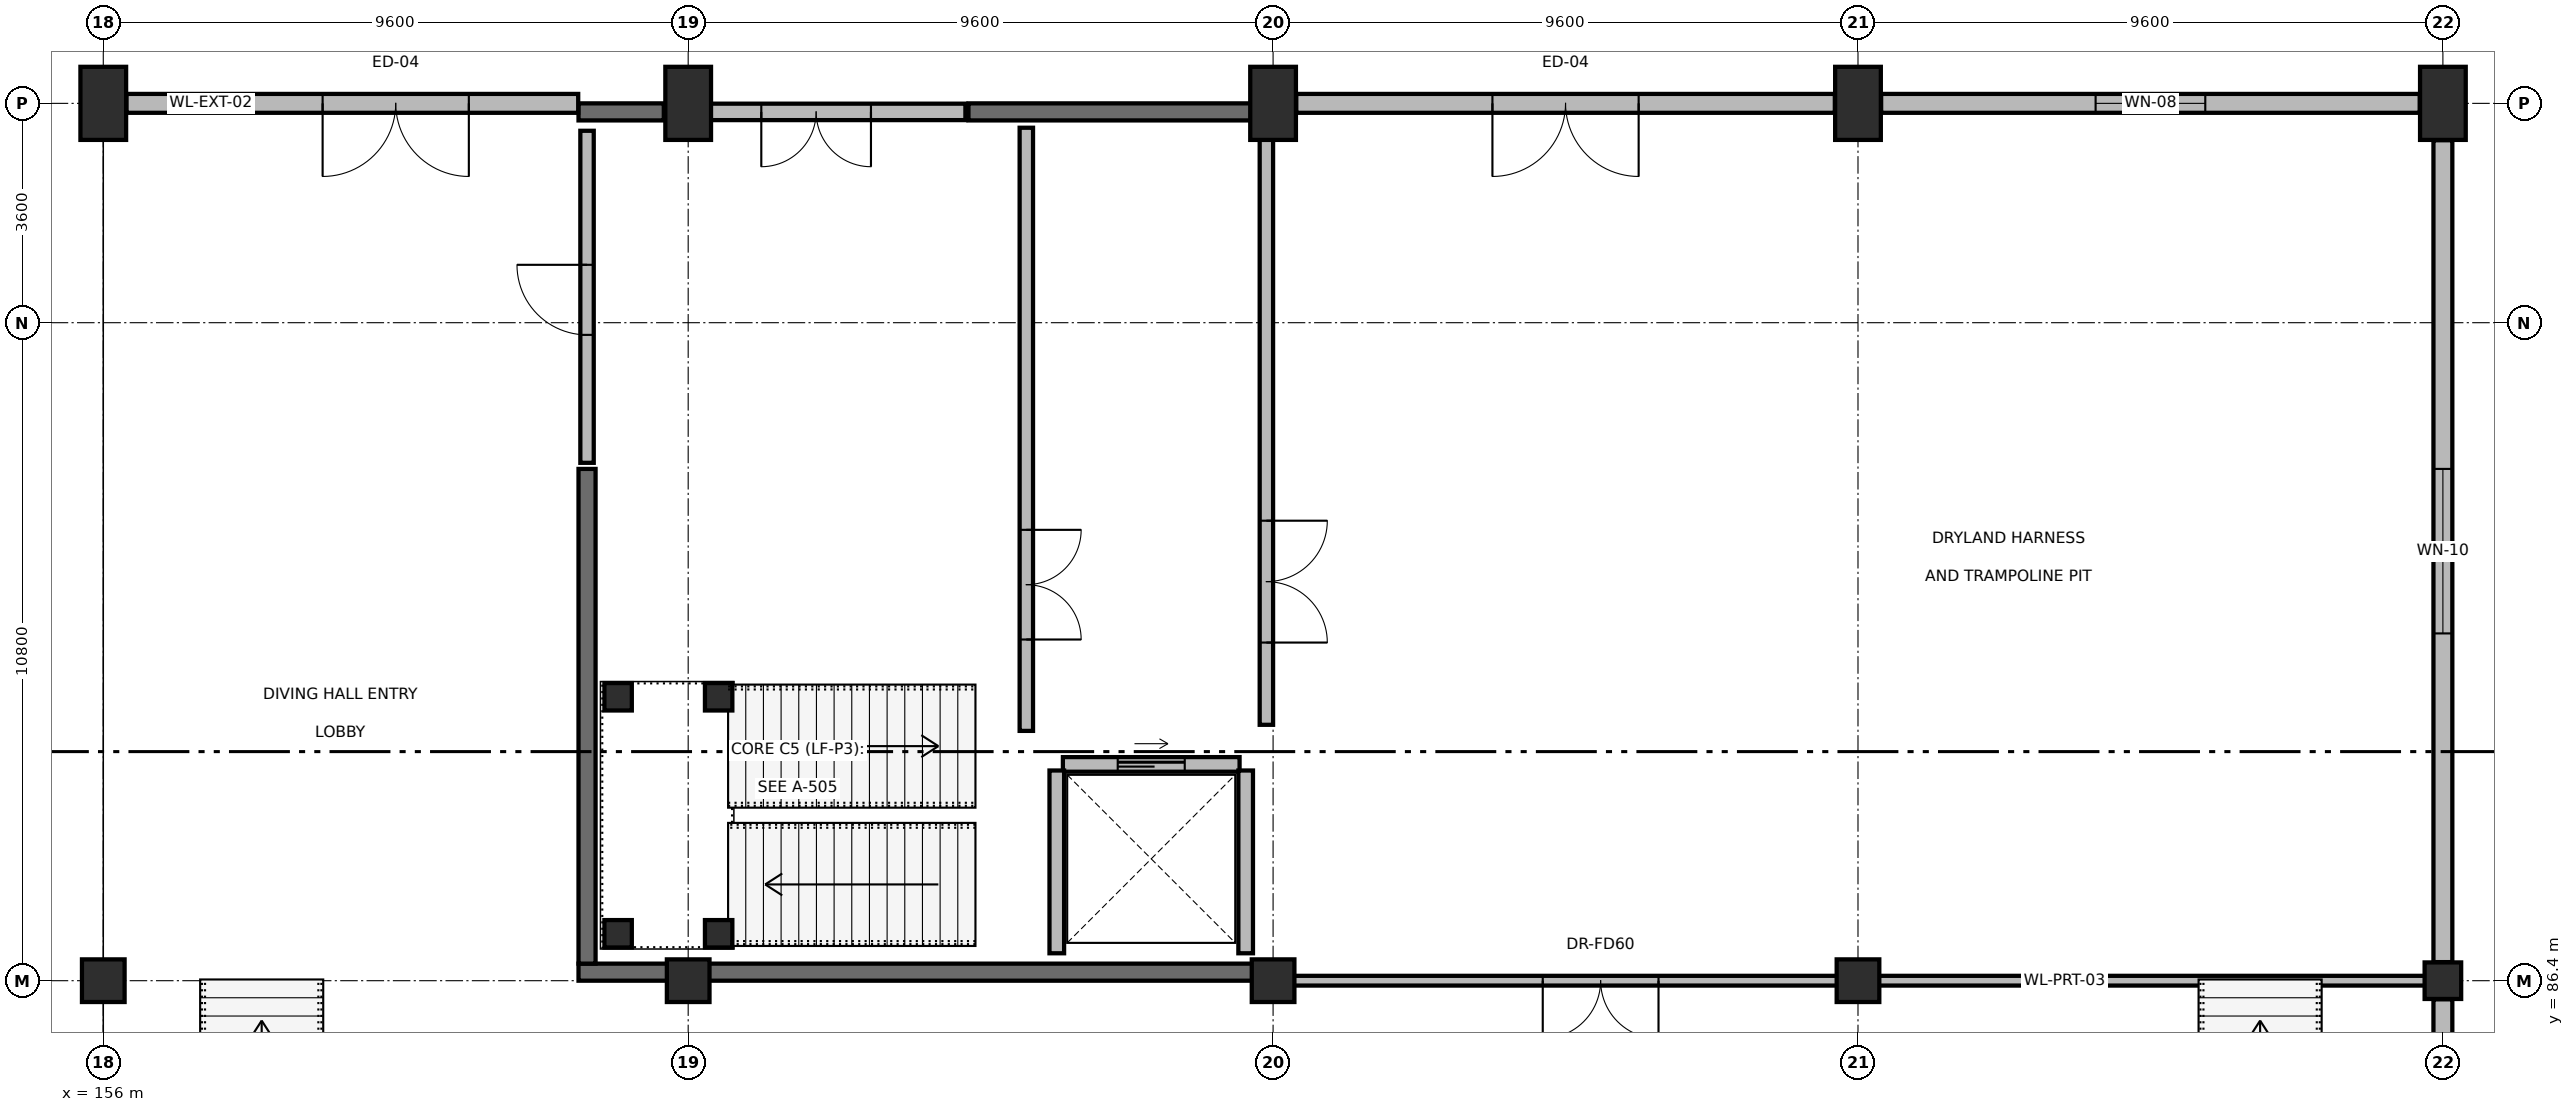
"""IFC4 building model, lengths in metres.
Left out: names, types, materials, properties, quantities, classifications, styles, units other than length and angle.
Written with IfcOpenShell. Run it as: python <this file> out.ifc"""

import sys

from ifc_helpers import new_model, si_unit, direction, frame, frame_2d, origin, origin_2d, place, context, subcontext, project, spatial, rectangle, extrude, element, fill, save


model = new_model("IFC4")
c1 = context("Model", 3, precision=1e-05, world=origin(), true_north=direction((0.0, 1.0)))
c2 = subcontext(c1, "Body", "Model", "MODEL_VIEW")
j1 = project(units=[si_unit("LENGTHUNIT", "METRE"), si_unit("PLANEANGLEUNIT", "RADIAN")], contexts=[c1])
p1 = place(None, origin())
s1 = spatial("IfcSite", under=j1, at=p1, CompositionType="ELEMENT")
p2 = place(p1, origin())
s2 = spatial("IfcBuilding", under=s1, at=p2, CompositionType="ELEMENT")
p3 = place(p2, origin())
s3 = spatial("IfcBuildingStorey", under=s2, at=p3, CompositionType="ELEMENT", Elevation=0.0)
for number, where, z_axis, x_axis in (
    (1, (156.0, 100.8, 0.0), (0.0, 0.0, 1.0), (1.0, 0.0, 0.0)),
    (2, (165.6, 100.8, 0.0), (0.0, 0.0, 1.0), (1.0, 0.0, 0.0)),
    (3, (175.2, 100.8, 0.0), (0.0, 0.0, 1.0), (1.0, 0.0, 0.0)),
    (4, (184.8, 100.8, 0.0), (0.0, 0.0, 1.0), (1.0, 0.0, 0.0)),
    (5, (194.4, 100.8, 0.0), (0.0, 0.0, 1.0), (1.0, 0.0, 0.0)),
):
    element("IfcColumn", number, at=place(p3, frame(where, z_axis=z_axis, x_axis=x_axis)), inside=s3, PredefinedType="COLUMN", context=c2, shape_type="SweptSolid", body=[
        extrude(rectangle(XDim=0.75, YDim=1.2, at=origin_2d()), origin(), (0.0, 0.0, 1.0), 4.8),
    ])
for number, where, z_axis, x_axis in (
    (6, (156.0, 86.4, 0.0), (0.0, 0.0, 1.0), (1.0, 0.0, 0.0)),
    (7, (165.6, 86.4, 0.0), (0.0, 0.0, 1.0), (1.0, 0.0, 0.0)),
    (8, (175.2, 86.4, 0.0), (0.0, 0.0, 1.0), (1.0, 0.0, 0.0)),
    (9, (184.8, 86.4, 0.0), (0.0, 0.0, 1.0), (1.0, 0.0, 0.0)),
):
    element("IfcColumn", number, at=place(p3, frame(where, z_axis=z_axis, x_axis=x_axis)), inside=s3, PredefinedType="COLUMN", context=c2, shape_type="SweptSolid", body=[
        extrude(rectangle(XDim=0.7, YDim=0.7, at=origin_2d()), origin(), (0.0, 0.0, 1.0), 4.8),
    ])
p4 = place(p3, frame((194.4, 86.4, 0.0), z_axis=(0.0, 0.0, 1.0), x_axis=(1.0, 0.0, 0.0)))
e10 = element("IfcColumn", 10, at=p4, inside=s3, PredefinedType="COLUMN", context=c2, shape_type="SweptSolid", body=[
    extrude(rectangle(XDim=0.6, YDim=0.6, at=origin_2d()), origin(), (0.0, 0.0, 1.0), 4.8),
])
p5 = place(p3, frame((163.8, 86.54, 0.0), z_axis=(0.0, 0.0, 1.0), x_axis=(1.0, 0.0, 0.0)))
e11 = element("IfcWall", 11, at=p5, inside=s3, PredefinedType="SHEAR", context=c2, shape_type="SweptSolid", body=[
    extrude(rectangle(XDim=11.4, YDim=0.28, at=frame_2d((5.7, 0.0))), origin(), (0.0, 0.0, 1.0), 4.8),
])
p6 = place(p3, frame((163.8, 100.66, 0.0), z_axis=(0.0, 0.0, 1.0), x_axis=(1.0, 0.0, 0.0)))
e12 = element("IfcWall", 12, at=p6, inside=s3, PredefinedType="SHEAR", context=c2, shape_type="SweptSolid", body=[
    extrude(rectangle(XDim=1.4, YDim=0.28, at=frame_2d((0.7, 0.0))), origin(), (0.0, 0.0, 1.0), 4.8),
])
p7 = place(p3, frame((170.2, 100.66, 0.0), z_axis=(0.0, 0.0, 1.0), x_axis=(1.0, 0.0, 0.0)))
e13 = element("IfcWall", 13, at=p7, inside=s3, PredefinedType="SHEAR", context=c2, shape_type="SweptSolid", body=[
    extrude(rectangle(XDim=5.0, YDim=0.28, at=frame_2d((2.5, 0.0))), origin(), (0.0, 0.0, 1.0), 4.8),
])
p8 = place(p3, frame((163.94, 86.68, 0.0), z_axis=(0.0, 0.0, 1.0), x_axis=(0.0, 1.0, 0.0)))
e14 = element("IfcWall", 14, at=p8, inside=s3, PredefinedType="SHEAR", context=c2, shape_type="SweptSolid", body=[
    extrude(rectangle(XDim=8.12, YDim=0.28, at=frame_2d((4.06, 0.0))), origin(), (0.0, 0.0, 1.0), 4.8),
])
p9 = place(p3, frame((156.38, 100.8, 0.0), z_axis=(0.0, 0.0, 1.0), x_axis=(1.0, 0.0, 0.0)))
e15 = element("IfcWall", 15, at=p9, inside=s3, PredefinedType="SOLIDWALL", context=c2, shape_type="SweptSolid", body=[
    extrude(rectangle(XDim=7.415, YDim=0.31, at=frame_2d((3.708, 0.0))), origin(), (0.0, 0.0, 1.0), 3.835),
])
p10 = place(p9, frame((3.22, 0.0, 0.0)))
e16 = element("IfcOpeningElement", 16, at=p10, cuts=e15, PredefinedType="OPENING", context=c2, shape_type="SweptSolid", body=[
    extrude(rectangle(XDim=2.4, YDim=2.4, at=frame_2d((1.2, 1.2))), frame((0.0, 0.165, 0.0), z_axis=(0.0, -1.0, 0.0), x_axis=(1.0, 0.0, 0.0)), (0.0, 0.0, 1.0), 0.33),
])
p11 = place(p3, frame((175.58, 100.8, 0.0), z_axis=(0.0, 0.0, 1.0), x_axis=(1.0, 0.0, 0.0)))
e17 = element("IfcWall", 17, at=p11, inside=s3, PredefinedType="SOLIDWALL", context=c2, shape_type="SweptSolid", body=[
    extrude(rectangle(XDim=8.84, YDim=0.31, at=frame_2d((4.42, 0.0))), origin(), (0.0, 0.0, 1.0), 3.835),
])
p12 = place(p11, frame((3.22, 0.0, 0.0)))
e18 = element("IfcOpeningElement", 18, at=p12, cuts=e17, PredefinedType="OPENING", context=c2, shape_type="SweptSolid", body=[
    extrude(rectangle(XDim=2.4, YDim=2.4, at=frame_2d((1.2, 1.2))), frame((0.0, 0.165, 0.0), z_axis=(0.0, -1.0, 0.0), x_axis=(1.0, 0.0, 0.0)), (0.0, 0.0, 1.0), 0.33),
])
p13 = place(p3, frame((185.18, 100.8, 0.0), z_axis=(0.0, 0.0, 1.0), x_axis=(1.0, 0.0, 0.0)))
e19 = element("IfcWall", 19, at=p13, inside=s3, PredefinedType="SOLIDWALL", context=c2, shape_type="SweptSolid", body=[
    extrude(rectangle(XDim=8.84, YDim=0.31, at=frame_2d((4.42, 0.0))), origin(), (0.0, 0.0, 1.0), 3.835),
])
p14 = place(p13, frame((3.52, 0.0, 0.95)))
e20 = element("IfcOpeningElement", 20, at=p14, cuts=e19, PredefinedType="OPENING", context=c2, shape_type="SweptSolid", body=[
    extrude(rectangle(XDim=1.8, YDim=1.2, at=frame_2d((0.9, 0.6))), frame((0.0, 0.165, 0.0), z_axis=(0.0, -1.0, 0.0), x_axis=(1.0, 0.0, 0.0)), (0.0, 0.0, 1.0), 0.33),
])
p15 = place(p3, frame((194.4, 86.095, 0.0), z_axis=(0.0, 0.0, 1.0), x_axis=(0.0, -1.0, 0.0)))
e21 = element("IfcWall", 21, at=p15, inside=s3, PredefinedType="SOLIDWALL", context=c2, shape_type="SweptSolid", body=[
    extrude(rectangle(XDim=8.515, YDim=0.31, at=frame_2d((4.257, 0.0))), origin(), (0.0, 0.0, 1.0), 3.95),
])
p16 = place(p15, frame((3.058, 0.0, 0.0)))
e22 = element("IfcOpeningElement", 22, at=p16, cuts=e21, PredefinedType="OPENING", context=c2, shape_type="SweptSolid", body=[
    extrude(rectangle(XDim=2.4, YDim=2.4, at=frame_2d((1.2, 1.2))), frame((0.0, 0.165, 0.0), z_axis=(0.0, -1.0, 0.0), x_axis=(1.0, 0.0, 0.0)), (0.0, 0.0, 1.0), 0.33),
])
p17 = place(p3, frame((194.4, 100.195, 0.0), z_axis=(0.0, 0.0, 1.0), x_axis=(0.0, -1.0, 0.0)))
e23 = element("IfcWall", 23, at=p17, inside=s3, PredefinedType="SOLIDWALL", context=c2, shape_type="SweptSolid", body=[
    extrude(rectangle(XDim=13.49, YDim=0.31, at=frame_2d((6.745, 0.0))), origin(), (0.0, 0.0, 1.0), 3.835),
])
p18 = place(p17, frame((5.395, 0.0, 0.95)))
e24 = element("IfcOpeningElement", 24, at=p18, cuts=e23, PredefinedType="OPENING", context=c2, shape_type="SweptSolid", body=[
    extrude(rectangle(XDim=2.7, YDim=1.5, at=frame_2d((1.35, 0.75))), frame((0.0, 0.165, 0.0), z_axis=(0.0, -1.0, 0.0), x_axis=(1.0, 0.0, 0.0)), (0.0, 0.0, 1.0), 0.33),
])
p19 = place(p3, frame((165.25, 100.66, 0.0), z_axis=(0.0, 0.0, 1.0), x_axis=(1.0, 0.0, 0.0)))
e25 = element("IfcWall", 25, at=p19, inside=s3, PredefinedType="SOLIDWALL", context=c2, shape_type="SweptSolid", body=[
    extrude(rectangle(XDim=4.9, YDim=0.27, at=frame_2d((2.45, 0.0))), origin(), (0.0, 0.0, 1.0), 3.835),
])
p20 = place(p19, frame((1.55, 0.0, 0.0)))
e26 = element("IfcOpeningElement", 26, at=p20, cuts=e25, PredefinedType="OPENING", context=c2, shape_type="SweptSolid", body=[
    extrude(rectangle(XDim=1.8, YDim=2.3, at=frame_2d((0.9, 1.15))), frame((0.0, 0.145, 0.0), z_axis=(0.0, -1.0, 0.0), x_axis=(1.0, 0.0, 0.0)), (0.0, 0.0, 1.0), 0.29),
])
p21 = place(p3, frame((171.15, 90.5, 0.0), z_axis=(0.0, 0.0, 1.0), x_axis=(0.0, 1.0, 0.0)))
e27 = element("IfcWall", 27, at=p21, inside=s3, PredefinedType="PARTITIONING", context=c2, shape_type="SweptSolid", body=[
    extrude(rectangle(XDim=9.9, YDim=0.22, at=frame_2d((4.95, 0.0))), origin(), (0.0, 0.0, 1.0), 4.505),
])
p22 = place(p21, frame((1.5, 0.0, 0.0)))
e28 = element("IfcOpeningElement", 28, at=p22, cuts=e27, PredefinedType="OPENING", context=c2, shape_type="SweptSolid", body=[
    extrude(rectangle(XDim=1.8, YDim=2.2, at=frame_2d((0.9, 1.1))), frame((0.0, 0.12, 0.0), z_axis=(0.0, -1.0, 0.0), x_axis=(1.0, 0.0, 0.0)), (0.0, 0.0, 1.0), 0.24),
])
p23 = place(p3, frame((171.75, 89.95, 0.0), z_axis=(0.0, 0.0, 1.0), x_axis=(1.0, 0.0, 0.0)))
e29 = element("IfcWall", 29, at=p23, inside=s3, PredefinedType="SOLIDWALL", context=c2, shape_type="SweptSolid", body=[
    extrude(rectangle(XDim=2.9, YDim=0.24, at=frame_2d((1.45, 0.0))), origin(), (0.0, 0.0, 1.0), 4.505),
])
p24 = place(p23, frame((0.9, 0.0, 0.0)))
e30 = element("IfcOpeningElement", 30, at=p24, cuts=e29, PredefinedType="OPENING", context=c2, shape_type="SweptSolid", body=[
    extrude(rectangle(XDim=1.1, YDim=2.15, at=frame_2d((0.55, 1.075))), frame((0.0, 0.13, 0.0), z_axis=(0.0, -1.0, 0.0), x_axis=(1.0, 0.0, 0.0)), (0.0, 0.0, 1.0), 0.26),
])
for number, where, z_axis, x_axis in (
    (31, (171.65, 86.85, 0.0), (0.0, 0.0, 1.0), (0.0, 1.0, 0.0)),
    (32, (174.75, 86.85, 0.0), (0.0, 0.0, 1.0), (0.0, 1.0, 0.0)),
):
    element("IfcWall", number, at=place(p3, frame(where, z_axis=z_axis, x_axis=x_axis)), inside=s3, PredefinedType="SOLIDWALL", context=c2, shape_type="SweptSolid", body=[
        extrude(rectangle(XDim=3.0, YDim=0.24, at=frame_2d((1.5, 0.0))), origin(), (0.0, 0.0, 1.0), 4.505),
    ])
p25 = place(p3, frame((175.09, 90.6, 0.0), z_axis=(0.0, 0.0, 1.0), x_axis=(0.0, 1.0, 0.0)))
e33 = element("IfcWall", 33, at=p25, inside=s3, PredefinedType="PARTITIONING", context=c2, shape_type="SweptSolid", body=[
    extrude(rectangle(XDim=9.75, YDim=0.22, at=frame_2d((4.875, 0.0))), origin(), (0.0, 0.0, 1.0), 3.785),
])
p26 = place(p25, frame((1.35, 0.0, 0.0)))
e34 = element("IfcOpeningElement", 34, at=p26, cuts=e33, PredefinedType="OPENING", context=c2, shape_type="SweptSolid", body=[
    extrude(rectangle(XDim=2.0, YDim=2.2, at=frame_2d((1.0, 1.1))), frame((0.0, 0.12, 0.0), z_axis=(0.0, -1.0, 0.0), x_axis=(1.0, 0.0, 0.0)), (0.0, 0.0, 1.0), 0.24),
])
p27 = place(p3, frame((163.94, 94.9, 0.0), z_axis=(0.0, 0.0, 1.0), x_axis=(0.0, 1.0, 0.0)))
e35 = element("IfcWall", 35, at=p27, inside=s3, PredefinedType="PARTITIONING", context=c2, shape_type="SweptSolid", body=[
    extrude(rectangle(XDim=5.45, YDim=0.22, at=frame_2d((2.725, 0.0))), origin(), (0.0, 0.0, 1.0), 4.505),
])
p28 = place(p27, frame((2.1, 0.0, 0.0)))
e36 = element("IfcOpeningElement", 36, at=p28, cuts=e35, PredefinedType="OPENING", context=c2, shape_type="SweptSolid", body=[
    extrude(rectangle(XDim=1.15, YDim=2.2, at=frame_2d((0.575, 1.1))), frame((0.0, 0.12, 0.0), z_axis=(0.0, -1.0, 0.0), x_axis=(1.0, 0.0, 0.0)), (0.0, 0.0, 1.0), 0.24),
])
p29 = place(p3, frame((175.2, 86.4, 0.0), z_axis=(0.0, 0.0, 1.0), x_axis=(1.0, 0.0, 0.0)))
e37 = element("IfcWall", 37, at=p29, inside=s3, PredefinedType="PARTITIONING", context=c2, shape_type="SweptSolid", body=[
    extrude(rectangle(XDim=19.2, YDim=0.16, at=frame_2d((9.6, 0.0))), origin(), (0.0, 0.0, 1.0), 3.785),
])
p30 = place(p29, frame((4.426, 0.0, 0.0)))
e38 = element("IfcOpeningElement", 38, at=p30, cuts=e37, PredefinedType="OPENING", context=c2, shape_type="SweptSolid", body=[
    extrude(rectangle(XDim=1.9, YDim=2.2, at=frame_2d((0.95, 1.1))), frame((0.0, 0.09, 0.0), z_axis=(0.0, -1.0, 0.0), x_axis=(1.0, 0.0, 0.0)), (0.0, 0.0, 1.0), 0.18),
])
for number, where, z_axis, x_axis in (
    (39, (164.45, 87.17, 0.0), (0.0, 0.0, 1.0), (1.0, 0.0, 0.0)),
    (40, (166.1, 87.17, 0.0), (0.0, 0.0, 1.0), (1.0, 0.0, 0.0)),
    (41, (164.45, 91.06, 0.0), (0.0, 0.0, 1.0), (1.0, 0.0, 0.0)),
    (42, (166.1, 91.06, 0.0), (0.0, 0.0, 1.0), (1.0, 0.0, 0.0)),
):
    element("IfcColumn", number, at=place(p3, frame(where, z_axis=z_axis, x_axis=x_axis)), inside=s3, PredefinedType="COLUMN", context=c2, shape_type="SweptSolid", body=[
        extrude(rectangle(XDim=0.45, YDim=0.45, at=origin_2d()), origin(), (0.0, 0.0, 1.0), 4.8),
    ])
p31 = place(p10, origin())
e43 = element("IfcDoor", 43, at=p31, inside=s3, OperationType="DOUBLE_DOOR_SINGLE_SWING", PredefinedType="DOOR", context=c2, shape_type="SweptSolid", body=[
    extrude(rectangle(XDim=2.4, YDim=2.4, at=frame_2d((1.2, 1.2))), frame((0.0, 0.025, 0.0), z_axis=(0.0, -1.0, 0.0), x_axis=(1.0, 0.0, 0.0)), (0.0, 0.0, 1.0), 0.05),
])
fill(e16, e43)
p32 = place(p12, origin())
e44 = element("IfcDoor", 44, at=p32, inside=s3, OperationType="DOUBLE_DOOR_SINGLE_SWING", PredefinedType="DOOR", context=c2, shape_type="SweptSolid", body=[
    extrude(rectangle(XDim=2.4, YDim=2.4, at=frame_2d((1.2, 1.2))), frame((0.0, 0.025, 0.0), z_axis=(0.0, -1.0, 0.0), x_axis=(1.0, 0.0, 0.0)), (0.0, 0.0, 1.0), 0.05),
])
fill(e18, e44)
p33 = place(p14, origin())
e45 = element("IfcWindow", 45, at=p33, inside=s3, PartitioningType="SINGLE_PANEL", PredefinedType="WINDOW", context=c2, shape_type="SweptSolid", body=[
    extrude(rectangle(XDim=1.8, YDim=1.2, at=frame_2d((0.9, 0.6))), frame((0.0, 0.03, 0.0), z_axis=(0.0, -1.0, 0.0), x_axis=(1.0, 0.0, 0.0)), (0.0, 0.0, 1.0), 0.06),
])
fill(e20, e45)
p34 = place(p18, origin())
e46 = element("IfcWindow", 46, at=p34, inside=s3, PartitioningType="SINGLE_PANEL", PredefinedType="WINDOW", context=c2, shape_type="SweptSolid", body=[
    extrude(rectangle(XDim=2.7, YDim=1.5, at=frame_2d((1.35, 0.75))), frame((0.0, 0.03, 0.0), z_axis=(0.0, -1.0, 0.0), x_axis=(1.0, 0.0, 0.0)), (0.0, 0.0, 1.0), 0.06),
])
fill(e24, e46)
p35 = place(p20, origin())
e47 = element("IfcDoor", 47, at=p35, inside=s3, OperationType="DOUBLE_DOOR_SINGLE_SWING", PredefinedType="DOOR", context=c2, shape_type="SweptSolid", body=[
    extrude(rectangle(XDim=1.8, YDim=2.3, at=frame_2d((0.9, 1.15))), frame((0.0, 0.025, 0.0), z_axis=(0.0, -1.0, 0.0), x_axis=(1.0, 0.0, 0.0)), (0.0, 0.0, 1.0), 0.05),
])
fill(e26, e47)
p36 = place(p22, origin())
e48 = element("IfcDoor", 48, at=p36, inside=s3, OperationType="DOUBLE_DOOR_SINGLE_SWING", PredefinedType="DOOR", context=c2, shape_type="SweptSolid", body=[
    extrude(rectangle(XDim=1.8, YDim=2.2, at=frame_2d((0.9, 1.1))), frame((0.0, 0.025, 0.0), z_axis=(0.0, -1.0, 0.0), x_axis=(1.0, 0.0, 0.0)), (0.0, 0.0, 1.0), 0.05),
])
fill(e28, e48)
p37 = place(p24, origin())
e49 = element("IfcDoor", 49, at=p37, inside=s3, OperationType="DOUBLE_DOOR_SLIDING", PredefinedType="DOOR", context=c2, shape_type="SweptSolid", body=[
    extrude(rectangle(XDim=1.1, YDim=2.15, at=frame_2d((0.55, 1.075))), frame((0.0, 0.025, 0.0), z_axis=(0.0, -1.0, 0.0), x_axis=(1.0, 0.0, 0.0)), (0.0, 0.0, 1.0), 0.05),
])
fill(e30, e49)
p38 = place(p26, origin())
e50 = element("IfcDoor", 50, at=p38, inside=s3, OperationType="DOUBLE_DOOR_SINGLE_SWING", PredefinedType="DOOR", context=c2, shape_type="SweptSolid", body=[
    extrude(rectangle(XDim=2.0, YDim=2.2, at=frame_2d((1.0, 1.1))), frame((0.0, 0.025, 0.0), z_axis=(0.0, -1.0, 0.0), x_axis=(1.0, 0.0, 0.0)), (0.0, 0.0, 1.0), 0.05),
])
fill(e34, e50)
p39 = place(p28, origin())
e51 = element("IfcDoor", 51, at=p39, inside=s3, OperationType="SINGLE_SWING_RIGHT", PredefinedType="DOOR", context=c2, shape_type="SweptSolid", body=[
    extrude(rectangle(XDim=1.15, YDim=2.2, at=frame_2d((0.575, 1.1))), frame((0.0, 0.025, 0.0), z_axis=(0.0, -1.0, 0.0), x_axis=(1.0, 0.0, 0.0)), (0.0, 0.0, 1.0), 0.05),
])
fill(e36, e51)
p40 = place(p30, origin())
e52 = element("IfcDoor", 52, at=p40, inside=s3, OperationType="DOUBLE_DOOR_SINGLE_SWING", PredefinedType="DOOR", context=c2, shape_type="SweptSolid", body=[
    extrude(rectangle(XDim=1.9, YDim=2.2, at=frame_2d((0.95, 1.1))), frame((0.0, 0.025, 0.0), z_axis=(0.0, -1.0, 0.0), x_axis=(1.0, 0.0, 0.0)), (0.0, 0.0, 1.0), 0.05),
])
fill(e38, e52)
save(model, sys.argv[1])
